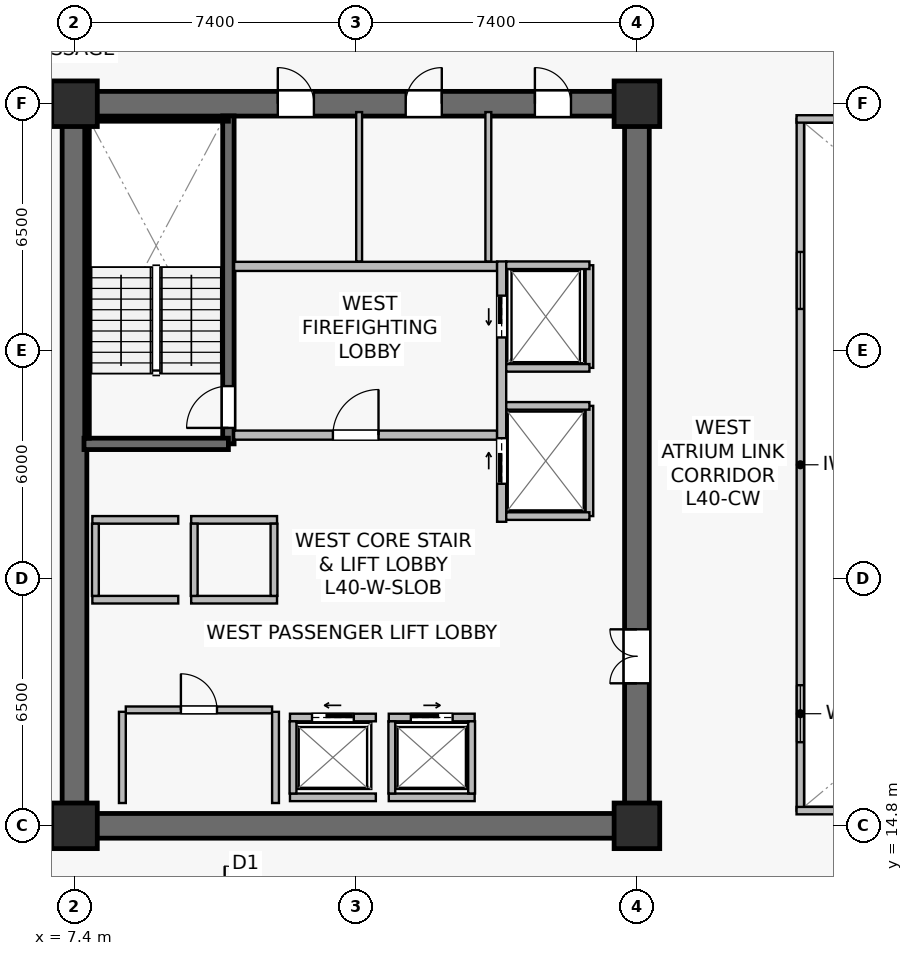
"""IFC4 building model, lengths in metres.
Left out: names, types, materials, properties, quantities, classifications, styles, units other than length and angle.
Written with IfcOpenShell. Run it as: python <this file> out.ifc"""

import sys

from ifc_helpers import new_model, si_unit, direction, frame, frame_2d, origin, origin_2d, place, context, subcontext, project, spatial, rectangle, extrude, source, transform, mapped, element, fill, save


model = new_model("IFC4")
c1 = context("Model", 3, precision=1e-05, world=origin(), true_north=direction((0.0, 1.0)))
c2 = subcontext(c1, "Body", "Model", "MODEL_VIEW")
j1 = project(units=[si_unit("LENGTHUNIT", "METRE"), si_unit("PLANEANGLEUNIT", "RADIAN")], contexts=[c1])
p1 = place(None, origin())
s1 = spatial("IfcSite", under=j1, at=p1, CompositionType="ELEMENT")
p2 = place(p1, origin())
s2 = spatial("IfcBuilding", under=s1, at=p2, CompositionType="ELEMENT")
p3 = place(p2, frame((0.0, 0.0, 166.6)))
s3 = spatial("IfcBuildingStorey", under=s2, at=p3, CompositionType="ELEMENT", Elevation=166.6)
p4 = place(p3, frame((7.075, 14.8, 0.0), z_axis=(0.0, 0.0, 1.0), x_axis=(1.0, 0.0, 0.0)))
e1 = element("IfcWall", 1, at=p4, inside=s3, PredefinedType="SHEAR", context=c2, shape_type="SweptSolid", body=[
    extrude(rectangle(XDim=15.45, YDim=0.65, at=frame_2d((7.725, 0.0))), origin(), (0.0, 0.0, 1.0), 3.79),
])
p5 = place(p3, frame((7.075, 33.8, 0.0), z_axis=(0.0, 0.0, 1.0), x_axis=(1.0, 0.0, 0.0)))
e2 = element("IfcWall", 2, at=p5, inside=s3, PredefinedType="SHEAR", context=c2, shape_type="SweptSolid", body=[
    extrude(rectangle(XDim=15.45, YDim=0.65, at=frame_2d((7.725, 0.0))), origin(), (0.0, 0.0, 1.0), 3.79),
])
p6 = place(p5, frame((5.675, 0.0, 0.0)))
e3 = element("IfcOpeningElement", 3, at=p6, cuts=e2, PredefinedType="OPENING", context=c2, shape_type="SweptSolid", body=[
    extrude(rectangle(XDim=0.95, YDim=2.15, at=frame_2d((0.475, 1.075))), frame((0.0, 0.335, 0.0), z_axis=(0.0, -1.0, 0.0), x_axis=(1.0, 0.0, 0.0)), (0.0, 0.0, 1.0), 0.67),
])
p7 = place(p5, frame((9.04, 0.0, 0.0)))
e4 = element("IfcOpeningElement", 4, at=p7, cuts=e2, PredefinedType="OPENING", context=c2, shape_type="SweptSolid", body=[
    extrude(rectangle(XDim=0.95, YDim=2.15, at=frame_2d((0.475, 1.075))), frame((0.0, 0.335, 0.0), z_axis=(0.0, -1.0, 0.0), x_axis=(1.0, 0.0, 0.0)), (0.0, 0.0, 1.0), 0.67),
])
p8 = place(p5, frame((12.44, 0.0, 0.0)))
e5 = element("IfcOpeningElement", 5, at=p8, cuts=e2, PredefinedType="OPENING", context=c2, shape_type="SweptSolid", body=[
    extrude(rectangle(XDim=0.95, YDim=2.15, at=frame_2d((0.475, 1.075))), frame((0.0, 0.335, 0.0), z_axis=(0.0, -1.0, 0.0), x_axis=(1.0, 0.0, 0.0)), (0.0, 0.0, 1.0), 0.67),
])
p9 = place(p3, frame((7.4, 15.125, 0.0), z_axis=(0.0, 0.0, 1.0), x_axis=(0.0, 1.0, 0.0)))
e6 = element("IfcWall", 6, at=p9, inside=s3, PredefinedType="SHEAR", context=c2, shape_type="SweptSolid", body=[
    extrude(rectangle(XDim=18.35, YDim=0.65, at=frame_2d((9.175, 0.0))), origin(), (0.0, 0.0, 1.0), 3.79),
])
p10 = place(p3, frame((22.2, 15.125, 0.0), z_axis=(0.0, 0.0, 1.0), x_axis=(0.0, 1.0, 0.0)))
e7 = element("IfcWall", 7, at=p10, inside=s3, PredefinedType="SHEAR", context=c2, shape_type="SweptSolid", body=[
    extrude(rectangle(XDim=18.35, YDim=0.65, at=frame_2d((9.175, 0.0))), origin(), (0.0, 0.0, 1.0), 3.79),
])
p11 = place(p10, frame((3.425, 0.0, 0.0)))
e8 = element("IfcOpeningElement", 8, at=p11, cuts=e7, PredefinedType="OPENING", context=c2, shape_type="SweptSolid", body=[
    extrude(rectangle(XDim=1.42, YDim=2.2, at=frame_2d((0.71, 1.1))), frame((0.0, 0.335, 0.0), z_axis=(0.0, -1.0, 0.0), x_axis=(1.0, 0.0, 0.0)), (0.0, 0.0, 1.0), 0.67),
])
p12 = place(p3, frame((11.45, 24.85, 0.0), z_axis=(0.0, 0.0, 1.0), x_axis=(0.0, 1.0, 0.0)))
e9 = element("IfcWall", 9, at=p12, inside=s3, PredefinedType="SHEAR", context=c2, shape_type="SweptSolid", body=[
    extrude(rectangle(XDim=8.63, YDim=0.3, at=frame_2d((4.315, 0.0))), origin(), (0.0, 0.0, 1.0), 3.79),
])
p13 = place(p12, frame((0.42, 0.0, 0.0)))
e10 = element("IfcOpeningElement", 10, at=p13, cuts=e9, PredefinedType="OPENING", context=c2, shape_type="SweptSolid", body=[
    extrude(rectangle(XDim=1.1, YDim=2.15, at=frame_2d((0.55, 1.075))), frame((0.0, 0.16, 0.0), z_axis=(0.0, -1.0, 0.0), x_axis=(1.0, 0.0, 0.0)), (0.0, 0.0, 1.0), 0.32),
])
p14 = place(p3, frame((7.65, 24.85, 0.0), z_axis=(0.0, 0.0, 1.0), x_axis=(1.0, 0.0, 0.0)))
e11 = element("IfcWall", 11, at=p14, inside=s3, PredefinedType="SHEAR", context=c2, shape_type="SweptSolid", body=[
    extrude(rectangle(XDim=3.8, YDim=0.3, at=frame_2d((1.9, 0.0))), origin(), (0.0, 0.0, 1.0), 3.79),
])
p15 = place(p3, frame((7.73, 33.4, 0.0), z_axis=(0.0, 0.0, 1.0), x_axis=(1.0, 0.0, 0.0)))
e12 = element("IfcWall", 12, at=p15, inside=s3, PredefinedType="SOLIDWALL", context=c2, shape_type="SweptSolid", body=[
    extrude(rectangle(XDim=3.72, YDim=0.12, at=frame_2d((1.86, 0.0))), origin(), (0.0, 0.0, 1.0), 3.79),
])
p16 = place(p3, frame((7.73, 25.0, 0.0), z_axis=(0.0, 0.0, 1.0), x_axis=(0.0, 1.0, 0.0)))
e13 = element("IfcWall", 13, at=p16, inside=s3, PredefinedType="SOLIDWALL", context=c2, shape_type="SweptSolid", body=[
    extrude(rectangle(XDim=8.32, YDim=0.12, at=frame_2d((4.16, 0.0))), origin(), (0.0, 0.0, 1.0), 3.79),
])
m1 = source(origin(), c2, "Body", "SweptSolid", [
    extrude(rectangle(XDim=1.2, YDim=1.2, at=origin_2d()), origin(), (0.0, 0.0, 1.0), 4.1),
])
for number, where, z_axis, x_axis in (
    (14, (7.4, 14.8, 0.0), (0.0, 0.0, 1.0), (1.0, 0.0, 0.0)),
    (15, (22.2, 14.8, 0.0), (0.0, 0.0, 1.0), (1.0, 0.0, 0.0)),
    (16, (7.4, 33.8, 0.0), (0.0, 0.0, 1.0), (1.0, 0.0, 0.0)),
    (17, (22.2, 33.8, 0.0), (0.0, 0.0, 1.0), (1.0, 0.0, 0.0)),
):
    element("IfcColumn", number, at=place(p3, frame(where, z_axis=z_axis, x_axis=x_axis)), inside=s3, PredefinedType="COLUMN", context=c2, shape_type="MappedRepresentation", body=[
        mapped(m1, transform((0.0, 0.0, 0.0), scale=1.0)),
    ])
p17 = place(p3, frame((11.6, 25.08, 0.0), z_axis=(0.0, 0.0, 1.0), x_axis=(1.0, 0.0, 0.0)))
e18 = element("IfcWall", 18, at=p17, inside=s3, PredefinedType="SOLIDWALL", context=c2, shape_type="SweptSolid", body=[
    extrude(rectangle(XDim=6.92, YDim=0.24, at=frame_2d((3.46, 0.0))), origin(), (0.0, 0.0, 1.0), 3.187),
])
p18 = place(p17, frame((2.6, 0.0, 0.0)))
e19 = element("IfcOpeningElement", 19, at=p18, cuts=e18, PredefinedType="OPENING", context=c2, shape_type="SweptSolid", body=[
    extrude(rectangle(XDim=1.2, YDim=2.16, at=frame_2d((0.6, 1.08))), frame((0.0, 0.13, 0.0), z_axis=(0.0, -1.0, 0.0), x_axis=(1.0, 0.0, 0.0)), (0.0, 0.0, 1.0), 0.26),
])
p19 = place(p3, frame((11.6, 29.52, 0.0), z_axis=(0.0, 0.0, 1.0), x_axis=(1.0, 0.0, 0.0)))
e20 = element("IfcWall", 20, at=p19, inside=s3, PredefinedType="SOLIDWALL", context=c2, shape_type="SweptSolid", body=[
    extrude(rectangle(XDim=6.92, YDim=0.24, at=frame_2d((3.46, 0.0))), origin(), (0.0, 0.0, 1.0), 3.187),
])
p20 = place(p3, frame((18.64, 22.8, 0.0), z_axis=(0.0, 0.0, 1.0), x_axis=(0.0, 1.0, 0.0)))
e21 = element("IfcWall", 21, at=p20, inside=s3, PredefinedType="SOLIDWALL", context=c2, shape_type="SweptSolid", body=[
    extrude(rectangle(XDim=6.85, YDim=0.24, at=frame_2d((3.425, 0.0))), origin(), (0.0, 0.0, 1.0), 2.925),
])
p21 = place(p20, frame((4.85, 0.0, 0.0)))
e22 = element("IfcOpeningElement", 22, at=p21, cuts=e21, PredefinedType="OPENING", context=c2, shape_type="SweptSolid", body=[
    extrude(rectangle(XDim=1.1, YDim=2.22, at=frame_2d((0.55, 1.11))), frame((0.0, 0.13, 0.0), z_axis=(0.0, -1.0, 0.0), x_axis=(1.0, 0.0, 0.0)), (0.0, 0.0, 1.0), 0.26),
])
p22 = place(p20, frame((1.0, 0.0, 0.0)))
e23 = element("IfcOpeningElement", 23, at=p22, cuts=e21, PredefinedType="OPENING", context=c2, shape_type="SweptSolid", body=[
    extrude(rectangle(XDim=1.2, YDim=2.22, at=frame_2d((0.6, 1.11))), frame((0.0, 0.13, 0.0), z_axis=(0.0, -1.0, 0.0), x_axis=(1.0, 0.0, 0.0)), (0.0, 0.0, 1.0), 0.26),
])
p23 = place(p3, frame((13.07, 17.65, 0.0), z_axis=(0.0, 0.0, 1.0), x_axis=(1.0, 0.0, 0.0)))
e24 = element("IfcWall", 24, at=p23, inside=s3, PredefinedType="SOLIDWALL", context=c2, shape_type="SweptSolid", body=[
    extrude(rectangle(XDim=2.26, YDim=0.2, at=frame_2d((1.13, 0.0))), origin(), (0.0, 0.0, 1.0), 3.187),
])
p24 = place(p23, frame((0.58, 0.0, 0.0)))
e25 = element("IfcOpeningElement", 25, at=p24, cuts=e24, PredefinedType="OPENING", context=c2, shape_type="SweptSolid", body=[
    extrude(rectangle(XDim=1.1, YDim=2.22, at=frame_2d((0.55, 1.11))), frame((0.0, 0.11, 0.0), z_axis=(0.0, -1.0, 0.0), x_axis=(1.0, 0.0, 0.0)), (0.0, 0.0, 1.0), 0.22),
])
p25 = place(p3, frame((13.07, 15.55, 0.0), z_axis=(0.0, 0.0, 1.0), x_axis=(1.0, 0.0, 0.0)))
e26 = element("IfcWall", 26, at=p25, inside=s3, PredefinedType="SOLIDWALL", context=c2, shape_type="SweptSolid", body=[
    extrude(rectangle(XDim=2.26, YDim=0.2, at=frame_2d((1.13, 0.0))), origin(), (0.0, 0.0, 1.0), 3.187),
])
p26 = place(p3, frame((13.15, 15.65, 0.0), z_axis=(0.0, 0.0, 1.0), x_axis=(0.0, 1.0, 0.0)))
e27 = element("IfcWall", 27, at=p26, inside=s3, PredefinedType="SOLIDWALL", context=c2, shape_type="SweptSolid", body=[
    extrude(rectangle(XDim=1.9, YDim=0.18, at=frame_2d((0.95, 0.0))), origin(), (0.0, 0.0, 1.0), 3.79),
])
p27 = place(p3, frame((15.67, 17.65, 0.0), z_axis=(0.0, 0.0, 1.0), x_axis=(1.0, 0.0, 0.0)))
e28 = element("IfcWall", 28, at=p27, inside=s3, PredefinedType="SOLIDWALL", context=c2, shape_type="SweptSolid", body=[
    extrude(rectangle(XDim=2.26, YDim=0.2, at=frame_2d((1.13, 0.0))), origin(), (0.0, 0.0, 1.0), 3.79),
])
p28 = place(p27, frame((0.58, 0.0, 0.0)))
e29 = element("IfcOpeningElement", 29, at=p28, cuts=e28, PredefinedType="OPENING", context=c2, shape_type="SweptSolid", body=[
    extrude(rectangle(XDim=1.1, YDim=2.22, at=frame_2d((0.55, 1.11))), frame((0.0, 0.11, 0.0), z_axis=(0.0, -1.0, 0.0), x_axis=(1.0, 0.0, 0.0)), (0.0, 0.0, 1.0), 0.22),
])
p29 = place(p3, frame((15.67, 15.55, 0.0), z_axis=(0.0, 0.0, 1.0), x_axis=(1.0, 0.0, 0.0)))
e30 = element("IfcWall", 30, at=p29, inside=s3, PredefinedType="SOLIDWALL", context=c2, shape_type="SweptSolid", body=[
    extrude(rectangle(XDim=2.26, YDim=0.2, at=frame_2d((1.13, 0.0))), origin(), (0.0, 0.0, 1.0), 3.79),
])
for number, where, z_axis, x_axis in (
    (31, (15.75, 15.65, 0.0), (0.0, 0.0, 1.0), (0.0, 1.0, 0.0)),
    (32, (17.85, 15.65, 0.0), (0.0, 0.0, 1.0), (0.0, 1.0, 0.0)),
):
    element("IfcWall", number, at=place(p3, frame(where, z_axis=z_axis, x_axis=x_axis)), inside=s3, PredefinedType="SOLIDWALL", context=c2, shape_type="SweptSolid", body=[
        extrude(rectangle(XDim=1.9, YDim=0.18, at=frame_2d((0.95, 0.0))), origin(), (0.0, 0.0, 1.0), 3.79),
    ])
for number, where, z_axis, x_axis in (
    (33, (7.87, 20.75, 0.0), (0.0, 0.0, 1.0), (1.0, 0.0, 0.0)),
    (34, (7.87, 22.85, 0.0), (0.0, 0.0, 1.0), (1.0, 0.0, 0.0)),
):
    element("IfcWall", number, at=place(p3, frame(where, z_axis=z_axis, x_axis=x_axis)), inside=s3, PredefinedType="SOLIDWALL", context=c2, shape_type="SweptSolid", body=[
        extrude(rectangle(XDim=2.26, YDim=0.2, at=frame_2d((1.13, 0.0))), origin(), (0.0, 0.0, 1.0), 3.79),
    ])
p30 = place(p3, frame((7.95, 20.85, 0.0), z_axis=(0.0, 0.0, 1.0), x_axis=(0.0, 1.0, 0.0)))
e35 = element("IfcWall", 35, at=p30, inside=s3, PredefinedType="SOLIDWALL", context=c2, shape_type="SweptSolid", body=[
    extrude(rectangle(XDim=1.9, YDim=0.18, at=frame_2d((0.95, 0.0))), origin(), (0.0, 0.0, 1.0), 3.79),
])
for number, where, z_axis, x_axis in (
    (36, (10.47, 20.75, 0.0), (0.0, 0.0, 1.0), (1.0, 0.0, 0.0)),
    (37, (10.47, 22.85, 0.0), (0.0, 0.0, 1.0), (1.0, 0.0, 0.0)),
):
    element("IfcWall", number, at=place(p3, frame(where, z_axis=z_axis, x_axis=x_axis)), inside=s3, PredefinedType="SOLIDWALL", context=c2, shape_type="SweptSolid", body=[
        extrude(rectangle(XDim=2.26, YDim=0.2, at=frame_2d((1.13, 0.0))), origin(), (0.0, 0.0, 1.0), 3.79),
    ])
for number, where, z_axis, x_axis in (
    (38, (10.55, 20.85, 0.0), (0.0, 0.0, 1.0), (0.0, 1.0, 0.0)),
    (39, (12.65, 20.85, 0.0), (0.0, 0.0, 1.0), (0.0, 1.0, 0.0)),
):
    element("IfcWall", number, at=place(p3, frame(where, z_axis=z_axis, x_axis=x_axis)), inside=s3, PredefinedType="SOLIDWALL", context=c2, shape_type="SweptSolid", body=[
        extrude(rectangle(XDim=1.9, YDim=0.18, at=frame_2d((0.95, 0.0))), origin(), (0.0, 0.0, 1.0), 3.79),
    ])
p31 = place(p3, frame((20.95, 26.85, 0.0), z_axis=(0.0, 0.0, 1.0), x_axis=(0.0, 1.0, 0.0)))
e40 = element("IfcWall", 40, at=p31, inside=s3, PredefinedType="SOLIDWALL", context=c2, shape_type="SweptSolid", body=[
    extrude(rectangle(XDim=2.7, YDim=0.2, at=frame_2d((1.35, 0.0))), origin(), (0.0, 0.0, 1.0), 3.79),
])
p32 = place(p3, frame((18.76, 29.55, 0.0), z_axis=(0.0, 0.0, 1.0), x_axis=(1.0, 0.0, 0.0)))
e41 = element("IfcWall", 41, at=p32, inside=s3, PredefinedType="SOLIDWALL", context=c2, shape_type="SweptSolid", body=[
    extrude(rectangle(XDim=2.19, YDim=0.2, at=frame_2d((1.095, 0.0))), origin(), (0.0, 0.0, 1.0), 3.79),
])
p33 = place(p3, frame((18.76, 26.85, 0.0), z_axis=(0.0, 0.0, 1.0), x_axis=(1.0, 0.0, 0.0)))
e42 = element("IfcWall", 42, at=p33, inside=s3, PredefinedType="SOLIDWALL", context=c2, shape_type="SweptSolid", body=[
    extrude(rectangle(XDim=2.19, YDim=0.2, at=frame_2d((1.095, 0.0))), origin(), (0.0, 0.0, 1.0), 3.187),
])
p34 = place(p3, frame((20.95, 22.95, 0.0), z_axis=(0.0, 0.0, 1.0), x_axis=(0.0, 1.0, 0.0)))
e43 = element("IfcWall", 43, at=p34, inside=s3, PredefinedType="SOLIDWALL", context=c2, shape_type="SweptSolid", body=[
    extrude(rectangle(XDim=2.9, YDim=0.2, at=frame_2d((1.45, 0.0))), origin(), (0.0, 0.0, 1.0), 2.925),
])
for number, where, z_axis, x_axis in (
    (44, (18.76, 25.85, 0.0), (0.0, 0.0, 1.0), (1.0, 0.0, 0.0)),
    (45, (18.76, 22.95, 0.0), (0.0, 0.0, 1.0), (1.0, 0.0, 0.0)),
):
    element("IfcWall", number, at=place(p3, frame(where, z_axis=z_axis, x_axis=x_axis)), inside=s3, PredefinedType="SOLIDWALL", context=c2, shape_type="SweptSolid", body=[
        extrude(rectangle(XDim=2.19, YDim=0.2, at=frame_2d((1.095, 0.0))), origin(), (0.0, 0.0, 1.0), 3.79),
    ])
p35 = place(p3, frame((8.75, 17.85, 0.0), z_axis=(0.0, 0.0, 1.0), x_axis=(1.0, 0.0, 0.0)))
e46 = element("IfcWall", 46, at=p35, inside=s3, PredefinedType="SOLIDWALL", context=c2, shape_type="SweptSolid", body=[
    extrude(rectangle(XDim=3.85, YDim=0.18, at=frame_2d((1.925, 0.0))), origin(), (0.0, 0.0, 1.0), 3.79),
])
p36 = place(p35, frame((1.45, 0.0, 0.0)))
e47 = element("IfcOpeningElement", 47, at=p36, cuts=e46, PredefinedType="OPENING", context=c2, shape_type="SweptSolid", body=[
    extrude(rectangle(XDim=0.95, YDim=2.15, at=frame_2d((0.475, 1.075))), frame((0.0, 0.1, 0.0), z_axis=(0.0, -1.0, 0.0), x_axis=(1.0, 0.0, 0.0)), (0.0, 0.0, 1.0), 0.2),
])
for number, where, z_axis, x_axis in (
    (48, (12.69, 15.4, 0.0), (0.0, 0.0, 1.0), (0.0, 1.0, 0.0)),
    (49, (8.66, 15.4, 0.0), (0.0, 0.0, 1.0), (0.0, 1.0, 0.0)),
):
    element("IfcWall", number, at=place(p3, frame(where, z_axis=z_axis, x_axis=x_axis)), inside=s3, PredefinedType="SOLIDWALL", context=c2, shape_type="SweptSolid", body=[
        extrude(rectangle(XDim=2.4, YDim=0.18, at=frame_2d((1.2, 0.0))), origin(), (0.0, 0.0, 1.0), 3.79),
    ])
p37 = place(p3, frame((14.89, 29.65, 0.0), z_axis=(0.0, 0.0, 1.0), x_axis=(0.0, 1.0, 0.0)))
e50 = element("IfcWall", 50, at=p37, inside=s3, PredefinedType="PLUMBINGWALL", context=c2, shape_type="SweptSolid", body=[
    extrude(rectangle(XDim=3.93, YDim=0.155, at=frame_2d((1.965, 0.0))), origin(), (0.0, 0.0, 1.0), 3.187),
])
p38 = place(p3, frame((18.29, 29.65, 0.0), z_axis=(0.0, 0.0, 1.0), x_axis=(0.0, 1.0, 0.0)))
e51 = element("IfcWall", 51, at=p38, inside=s3, PredefinedType="PLUMBINGWALL", context=c2, shape_type="SweptSolid", body=[
    extrude(rectangle(XDim=3.93, YDim=0.155, at=frame_2d((1.965, 0.0))), origin(), (0.0, 0.0, 1.0), 3.79),
])
p39 = place(p3, frame((26.5, 15.2, 0.0), z_axis=(0.0, 0.0, 1.0), x_axis=(0.0, 1.0, 0.0)))
e52 = element("IfcWall", 52, at=p39, inside=s3, PredefinedType="SOLIDWALL", context=c2, shape_type="SweptSolid", body=[
    extrude(rectangle(XDim=18.2, YDim=0.195, at=frame_2d((9.1, 0.0))), origin(), (0.0, 0.0, 1.0), 3.79),
])
p40 = place(p39, frame((1.8, 0.0, 0.9)))
e53 = element("IfcOpeningElement", 53, at=p40, cuts=e52, PredefinedType="OPENING", context=c2, shape_type="SweptSolid", body=[
    extrude(rectangle(XDim=1.5, YDim=1.4, at=frame_2d((0.75, 0.7))), frame((0.0, 0.107, 0.0), z_axis=(0.0, -1.0, 0.0), x_axis=(1.0, 0.0, 0.0)), (0.0, 0.0, 1.0), 0.215),
])
p41 = place(p39, frame((13.2, 0.0, 0.9)))
e54 = element("IfcOpeningElement", 54, at=p41, cuts=e52, PredefinedType="OPENING", context=c2, shape_type="SweptSolid", body=[
    extrude(rectangle(XDim=1.5, YDim=1.4, at=frame_2d((0.75, 0.7))), frame((0.0, 0.107, 0.0), z_axis=(0.0, -1.0, 0.0), x_axis=(1.0, 0.0, 0.0)), (0.0, 0.0, 1.0), 0.215),
])
for number, where, z_axis, x_axis in (
    (55, (26.4, 15.2, 0.0), (0.0, 0.0, 1.0), (1.0, 0.0, 0.0)),
    (56, (26.4, 33.4, 0.0), (0.0, 0.0, 1.0), (1.0, 0.0, 0.0)),
):
    element("IfcWall", number, at=place(p3, frame(where, z_axis=z_axis, x_axis=x_axis)), inside=s3, PredefinedType="SOLIDWALL", context=c2, shape_type="SweptSolid", body=[
        extrude(rectangle(XDim=22.0, YDim=0.195, at=frame_2d((11.0, 0.0))), origin(), (0.0, 0.0, 1.0), 3.79),
    ])
m2 = source(origin(), c2, "Body", "SweptSolid", [
    extrude(rectangle(XDim=1.5, YDim=1.4, at=frame_2d((0.75, 0.7))), frame((0.0, 0.03, 0.0), z_axis=(0.0, -1.0, 0.0), x_axis=(1.0, 0.0, 0.0)), (0.0, 0.0, 1.0), 0.06),
])
p42 = place(p40, origin())
e57 = element("IfcWindow", 57, at=p42, inside=s3, PartitioningType="SINGLE_PANEL", PredefinedType="WINDOW", context=c2, shape_type="MappedRepresentation", body=[
    mapped(m2, transform((0.0, 0.0, 0.0), scale=1.0)),
])
fill(e53, e57)
p43 = place(p41, origin())
e58 = element("IfcWindow", 58, at=p43, inside=s3, PartitioningType="SINGLE_PANEL", PredefinedType="WINDOW", context=c2, shape_type="MappedRepresentation", body=[
    mapped(m2, transform((0.0, 0.0, 0.0), scale=1.0)),
])
fill(e54, e58)
m3 = source(origin(), c2, "Body", "SweptSolid", [
    extrude(rectangle(XDim=1.1, YDim=2.15, at=frame_2d((0.55, 1.075))), frame((0.0, 0.025, 0.0), z_axis=(0.0, -1.0, 0.0), x_axis=(1.0, 0.0, 0.0)), (0.0, 0.0, 1.0), 0.05),
])
p44 = place(p13, origin())
e59 = element("IfcDoor", 59, at=p44, inside=s3, OperationType="SINGLE_SWING_LEFT", PredefinedType="DOOR", context=c2, shape_type="MappedRepresentation", body=[
    mapped(m3, transform((0.0, 0.0, 0.0), scale=1.0)),
])
fill(e10, e59)
m4 = source(origin(), c2, "Body", "SweptSolid", [
    extrude(rectangle(XDim=1.2, YDim=2.16, at=frame_2d((0.6, 1.08))), frame((0.0, 0.025, 0.0), z_axis=(0.0, -1.0, 0.0), x_axis=(1.0, 0.0, 0.0)), (0.0, 0.0, 1.0), 0.05),
])
p45 = place(p18, origin())
e60 = element("IfcDoor", 60, at=p45, inside=s3, OperationType="SINGLE_SWING_RIGHT", PredefinedType="DOOR", context=c2, shape_type="MappedRepresentation", body=[
    mapped(m4, transform((0.0, 0.0, 0.0), scale=1.0)),
])
fill(e19, e60)
m5 = source(origin(), c2, "Body", "SweptSolid", [
    extrude(rectangle(XDim=1.1, YDim=2.22, at=frame_2d((0.55, 1.11))), frame((0.0, 0.025, 0.0), z_axis=(0.0, -1.0, 0.0), x_axis=(1.0, 0.0, 0.0)), (0.0, 0.0, 1.0), 0.05),
])
p46 = place(p24, origin())
e61 = element("IfcDoor", 61, at=p46, inside=s3, OperationType="SLIDING_TO_LEFT", PredefinedType="USERDEFINED", context=c2, shape_type="MappedRepresentation", body=[
    mapped(m5, transform((0.0, 0.0, 0.0), scale=1.0)),
])
fill(e25, e61)
p47 = place(p28, origin())
e62 = element("IfcDoor", 62, at=p47, inside=s3, OperationType="SLIDING_TO_RIGHT", PredefinedType="USERDEFINED", context=c2, shape_type="MappedRepresentation", body=[
    mapped(m5, transform((0.0, 0.0, 0.0), scale=1.0)),
])
fill(e29, e62)
p48 = place(p21, origin())
e63 = element("IfcDoor", 63, at=p48, inside=s3, OperationType="SLIDING_TO_LEFT", PredefinedType="USERDEFINED", context=c2, shape_type="MappedRepresentation", body=[
    mapped(m5, transform((0.0, 0.0, 0.0), scale=1.0)),
])
fill(e22, e63)
m6 = source(origin(), c2, "Body", "SweptSolid", [
    extrude(rectangle(XDim=1.2, YDim=2.22, at=frame_2d((0.6, 1.11))), frame((0.0, 0.025, 0.0), z_axis=(0.0, -1.0, 0.0), x_axis=(1.0, 0.0, 0.0)), (0.0, 0.0, 1.0), 0.05),
])
p49 = place(p22, origin())
e64 = element("IfcDoor", 64, at=p49, inside=s3, OperationType="SLIDING_TO_RIGHT", PredefinedType="USERDEFINED", context=c2, shape_type="MappedRepresentation", body=[
    mapped(m6, transform((0.0, 0.0, 0.0), scale=1.0)),
])
fill(e23, e64)
m7 = source(origin(), c2, "Body", "SweptSolid", [
    extrude(rectangle(XDim=0.95, YDim=2.15, at=frame_2d((0.475, 1.075))), frame((0.0, 0.025, 0.0), z_axis=(0.0, -1.0, 0.0), x_axis=(1.0, 0.0, 0.0)), (0.0, 0.0, 1.0), 0.05),
])
p50 = place(p36, origin())
e65 = element("IfcDoor", 65, at=p50, inside=s3, OperationType="SINGLE_SWING_LEFT", PredefinedType="DOOR", context=c2, shape_type="MappedRepresentation", body=[
    mapped(m7, transform((0.0, 0.0, 0.0), scale=1.0)),
])
fill(e47, e65)
m8 = source(origin(), c2, "Body", "SweptSolid", [
    extrude(rectangle(XDim=1.42, YDim=2.2, at=frame_2d((0.71, 1.1))), frame((0.0, 0.025, 0.0), z_axis=(0.0, -1.0, 0.0), x_axis=(1.0, 0.0, 0.0)), (0.0, 0.0, 1.0), 0.05),
])
p51 = place(p11, origin())
e66 = element("IfcDoor", 66, at=p51, inside=s3, OperationType="DOUBLE_DOOR_SINGLE_SWING", PredefinedType="DOOR", context=c2, shape_type="MappedRepresentation", body=[
    mapped(m8, transform((0.0, 0.0, 0.0), scale=1.0)),
])
fill(e8, e66)
p52 = place(p6, origin())
e67 = element("IfcDoor", 67, at=p52, inside=s3, OperationType="SINGLE_SWING_LEFT", PredefinedType="DOOR", context=c2, shape_type="MappedRepresentation", body=[
    mapped(m7, transform((0.0, 0.0, 0.0), scale=1.0)),
])
fill(e3, e67)
p53 = place(p7, origin())
e68 = element("IfcDoor", 68, at=p53, inside=s3, OperationType="SINGLE_SWING_RIGHT", PredefinedType="DOOR", context=c2, shape_type="MappedRepresentation", body=[
    mapped(m7, transform((0.0, 0.0, 0.0), scale=1.0)),
])
fill(e4, e68)
p54 = place(p8, origin())
e69 = element("IfcDoor", 69, at=p54, inside=s3, OperationType="SINGLE_SWING_LEFT", PredefinedType="DOOR", context=c2, shape_type="MappedRepresentation", body=[
    mapped(m7, transform((0.0, 0.0, 0.0), scale=1.0)),
])
fill(e5, e69)
save(model, sys.argv[1])
